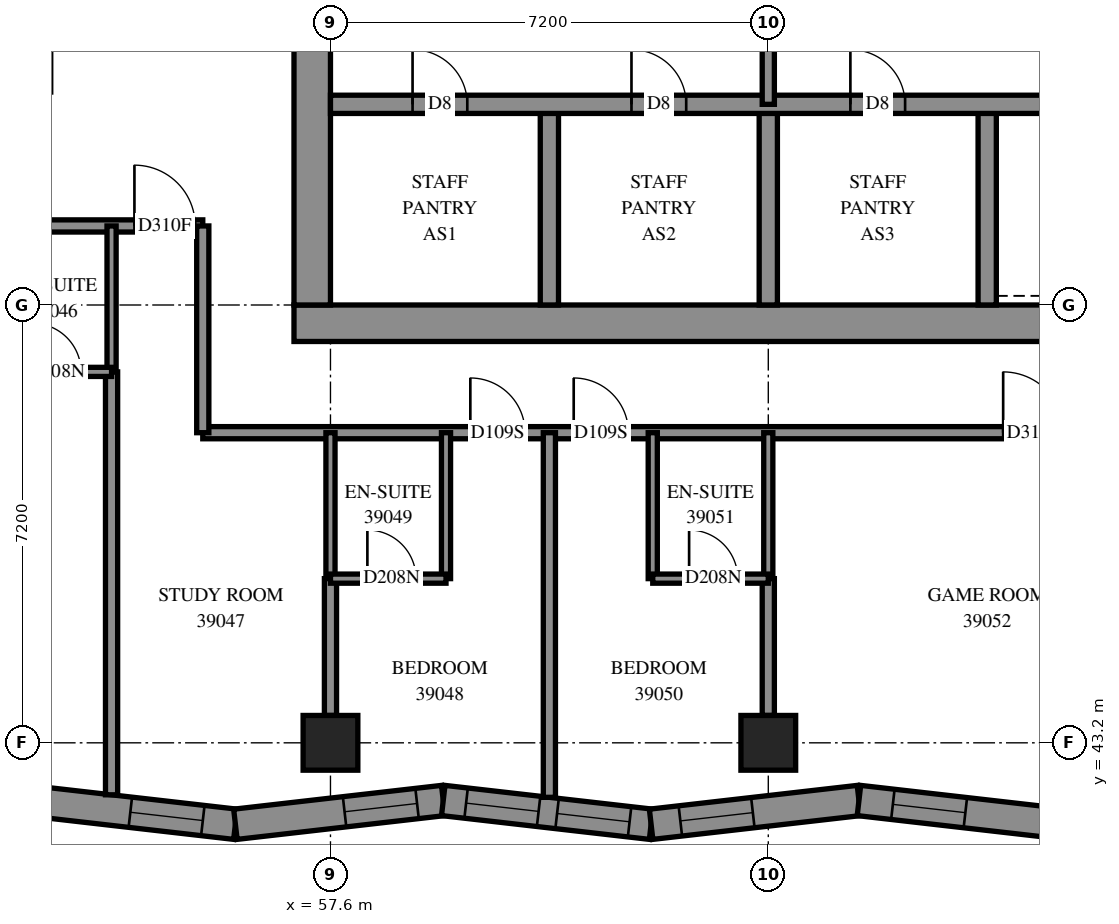
"""IFC4 building model, lengths in metres.
Left out: names, types, materials, properties, quantities, classifications, styles, units other than length and angle.
Written with IfcOpenShell. Run it as: python <this file> out.ifc"""

import sys

from ifc_helpers import new_model, si_unit, direction, frame, frame_2d, origin, origin_2d, place, context, subcontext, project, spatial, polyline, rectangle, outline, extrude, element, fill, save


model = new_model("IFC4")
c1 = context("Model", 3, precision=1e-05, world=origin(), true_north=direction((0.0, 1.0)))
c2 = subcontext(c1, "Body", "Model", "MODEL_VIEW")
j1 = project(units=[si_unit("LENGTHUNIT", "METRE"), si_unit("PLANEANGLEUNIT", "RADIAN")], contexts=[c1])
p1 = place(None, origin())
s1 = spatial("IfcSite", under=j1, at=p1, CompositionType="ELEMENT")
p2 = place(p1, origin())
s2 = spatial("IfcBuilding", under=s1, at=p2, CompositionType="ELEMENT")
p3 = place(p2, frame((0.0, 0.0, 145.6)))
s3 = spatial("IfcBuildingStorey", under=s2, at=p3, CompositionType="ELEMENT", Elevation=145.6)
for number, where, z_axis, x_axis in (
    (1, (57.6, 43.2, 0.0), (0.0, 0.0, 1.0), (1.0, 0.0, 0.0)),
    (2, (64.8, 43.2, 0.0), (0.0, 0.0, 1.0), (1.0, 0.0, 0.0)),
):
    element("IfcColumn", number, at=place(p3, frame(where, z_axis=z_axis, x_axis=x_axis)), inside=s3, PredefinedType="COLUMN", context=c2, shape_type="SweptSolid", body=[
        extrude(rectangle(XDim=0.9, YDim=0.9, at=origin_2d()), origin(), (0.0, 0.0, 1.0), 3.1),
    ])
p4 = place(p3, frame((57.0, 50.1, -0.3), z_axis=(0.0, 0.0, 1.0), x_axis=(1.0, 0.0, 0.0)))
e3 = element("IfcWall", 3, at=p4, inside=s3, PredefinedType="SHEAR", context=c2, shape_type="SweptSolid", body=[
    extrude(rectangle(XDim=15.6, YDim=0.6, at=frame_2d((7.8, 0.0))), origin(), (0.0, 0.0, 1.0), 2.7),
])
p5 = place(p3, frame((57.3, 50.4, -0.3), z_axis=(0.0, 0.0, 1.0), x_axis=(0.0, 1.0, 0.0)))
e4 = element("IfcWall", 4, at=p5, inside=s3, PredefinedType="SHEAR", context=c2, shape_type="SweptSolid", body=[
    extrude(rectangle(XDim=14.4, YDim=0.6, at=frame_2d((7.2, 0.0))), origin(), (0.0, 0.0, 1.0), 2.7),
])
p6 = place(p5, frame((4.55, 0.0, 0.3)))
e5 = element("IfcOpeningElement", 5, at=p6, cuts=e4, PredefinedType="OPENING", context=c2, shape_type="SweptSolid", body=[
    extrude(rectangle(XDim=1.1, YDim=2.1, at=frame_2d((0.55, 1.05))), frame((0.0, 0.31, 0.0), z_axis=(0.0, -1.0, 0.0), x_axis=(1.0, 0.0, 0.0)), (0.0, 0.0, 1.0), 0.62),
])
p7 = place(p5, frame((11.35, 0.0, 0.3)))
e6 = element("IfcOpeningElement", 6, at=p7, cuts=e4, PredefinedType="OPENING", context=c2, shape_type="SweptSolid", body=[
    extrude(rectangle(XDim=1.1, YDim=2.1, at=frame_2d((0.55, 1.05))), frame((0.0, 0.31, 0.0), z_axis=(0.0, -1.0, 0.0), x_axis=(1.0, 0.0, 0.0)), (0.0, 0.0, 1.0), 0.62),
])
for number, where, z_axis, x_axis in (
    (7, (61.2, 50.4, 0.0), (0.0, 0.0, 1.0), (0.0, 1.0, 0.0)),
    (8, (64.8, 50.4, 0.0), (0.0, 0.0, 1.0), (0.0, 1.0, 0.0)),
    (9, (68.4, 50.4, 0.0), (0.0, 0.0, 1.0), (0.0, 1.0, 0.0)),
):
    element("IfcWall", number, at=place(p3, frame(where, z_axis=z_axis, x_axis=x_axis)), inside=s3, PredefinedType="SOLIDWALL", context=c2, shape_type="SweptSolid", body=[
        extrude(rectangle(XDim=3.3, YDim=0.3, at=frame_2d((1.65, 0.0))), origin(), (0.0, 0.0, 1.0), 3.1),
    ])
p8 = place(p3, frame((57.6, 53.7, 0.0), z_axis=(0.0, 0.0, 1.0), x_axis=(1.0, 0.0, 0.0)))
e10 = element("IfcWall", 10, at=p8, inside=s3, PredefinedType="SOLIDWALL", context=c2, shape_type="SweptSolid", body=[
    extrude(rectangle(XDim=14.4, YDim=0.3, at=frame_2d((7.2, 0.0))), origin(), (0.0, 0.0, 1.0), 3.1),
])
p9 = place(p8, frame((1.35, 0.0, 0.0)))
e11 = element("IfcOpeningElement", 11, at=p9, cuts=e10, PredefinedType="OPENING", context=c2, shape_type="SweptSolid", body=[
    extrude(rectangle(XDim=0.9, YDim=2.1, at=frame_2d((0.45, 1.05))), frame((0.0, 0.16, 0.0), z_axis=(0.0, -1.0, 0.0), x_axis=(1.0, 0.0, 0.0)), (0.0, 0.0, 1.0), 0.32),
])
p10 = place(p8, frame((4.95, 0.0, 0.0)))
e12 = element("IfcOpeningElement", 12, at=p10, cuts=e10, PredefinedType="OPENING", context=c2, shape_type="SweptSolid", body=[
    extrude(rectangle(XDim=0.9, YDim=2.1, at=frame_2d((0.45, 1.05))), frame((0.0, 0.16, 0.0), z_axis=(0.0, -1.0, 0.0), x_axis=(1.0, 0.0, 0.0)), (0.0, 0.0, 1.0), 0.32),
])
p11 = place(p8, frame((8.55, 0.0, 0.0)))
e13 = element("IfcOpeningElement", 13, at=p11, cuts=e10, PredefinedType="OPENING", context=c2, shape_type="SweptSolid", body=[
    extrude(rectangle(XDim=0.9, YDim=2.1, at=frame_2d((0.45, 1.05))), frame((0.0, 0.16, 0.0), z_axis=(0.0, -1.0, 0.0), x_axis=(1.0, 0.0, 0.0)), (0.0, 0.0, 1.0), 0.32),
])
p12 = place(p8, frame((12.05, 0.0, 0.0)))
e14 = element("IfcOpeningElement", 14, at=p12, cuts=e10, PredefinedType="OPENING", context=c2, shape_type="SweptSolid", body=[
    extrude(rectangle(XDim=1.1, YDim=2.1, at=frame_2d((0.55, 1.05))), frame((0.0, 0.16, 0.0), z_axis=(0.0, -1.0, 0.0), x_axis=(1.0, 0.0, 0.0)), (0.0, 0.0, 1.0), 0.32),
])
p13 = place(p3, frame((52.597, 42.254, 0.0), z_axis=(0.0, 0.0, 1.0), x_axis=(0.9935199118, -0.1136581927, 0.0)))
e15 = element("IfcWall", 15, at=p13, inside=s3, PredefinedType="SOLIDWALL", context=c2, shape_type="SweptSolid", body=[
    extrude(outline(polyline([(0.05, -0.25), (3.491, -0.25), (3.433, 0.25), (-0.05, 0.25), (0.05, -0.25)])), origin(), (0.0, 0.0, 1.0), 3.1),
])
p14 = place(p13, frame((1.723, 0.0, 0.45)))
e16 = element("IfcOpeningElement", 16, at=p14, cuts=e15, PredefinedType="OPENING", context=c2, shape_type="SweptSolid", body=[
    extrude(rectangle(XDim=1.2, YDim=2.5, at=frame_2d((0.6, 1.25))), frame((0.0, 0.26, 0.0), z_axis=(0.0, -1.0, 0.0), x_axis=(1.0, 0.0, 0.0)), (0.0, 0.0, 1.0), 0.52),
])
p15 = place(p3, frame((56.036, 41.861, 0.0), z_axis=(0.0, 0.0, 1.0), x_axis=(0.9935208627, 0.1136498807, 0.0)))
e17 = element("IfcWall", 17, at=p15, inside=s3, PredefinedType="SOLIDWALL", context=c2, shape_type="SweptSolid", body=[
    extrude(outline(polyline([(-0.029, -0.25), (3.412, -0.25), (3.469, 0.25), (0.029, 0.25), (-0.029, -0.25)])), origin(), (0.0, 0.0, 1.0), 3.1),
])
p16 = place(p15, frame((1.807, 0.0, 0.45)))
e18 = element("IfcOpeningElement", 18, at=p16, cuts=e17, PredefinedType="OPENING", context=c2, shape_type="SweptSolid", body=[
    extrude(rectangle(XDim=1.2, YDim=2.5, at=frame_2d((0.6, 1.25))), frame((0.0, 0.26, 0.0), z_axis=(0.0, -1.0, 0.0), x_axis=(1.0, 0.0, 0.0)), (0.0, 0.0, 1.0), 0.52),
])
p17 = place(p3, frame((59.455, 42.252, 0.0), z_axis=(0.0, 0.0, 1.0), x_axis=(0.9935212381, -0.1136465988, 0.0)))
e19 = element("IfcWall", 19, at=p17, inside=s3, PredefinedType="SOLIDWALL", context=c2, shape_type="SweptSolid", body=[
    extrude(outline(polyline([(0.029, -0.25), (3.469, -0.25), (3.412, 0.25), (-0.029, 0.25), (0.029, -0.25)])), origin(), (0.0, 0.0, 1.0), 3.1),
])
p18 = place(p17, frame((0.378, 0.0, 0.45)))
e20 = element("IfcOpeningElement", 20, at=p18, cuts=e19, PredefinedType="OPENING", context=c2, shape_type="SweptSolid", body=[
    extrude(rectangle(XDim=1.2, YDim=2.5, at=frame_2d((0.6, 1.25))), frame((0.0, 0.26, 0.0), z_axis=(0.0, -1.0, 0.0), x_axis=(1.0, 0.0, 0.0)), (0.0, 0.0, 1.0), 0.52),
])
p19 = place(p17, frame((1.884, 0.0, 0.45)))
e21 = element("IfcOpeningElement", 21, at=p19, cuts=e19, PredefinedType="OPENING", context=c2, shape_type="SweptSolid", body=[
    extrude(rectangle(XDim=1.2, YDim=2.5, at=frame_2d((0.6, 1.25))), frame((0.0, 0.26, 0.0), z_axis=(0.0, -1.0, 0.0), x_axis=(1.0, 0.0, 0.0)), (0.0, 0.0, 1.0), 0.52),
])
p20 = place(p3, frame((62.873, 41.861, 0.0), z_axis=(0.0, 0.0, 1.0), x_axis=(0.9935212381, 0.1136465988, 0.0)))
e22 = element("IfcWall", 22, at=p20, inside=s3, PredefinedType="SOLIDWALL", context=c2, shape_type="SweptSolid", body=[
    extrude(outline(polyline([(-0.029, -0.25), (3.412, -0.25), (3.469, 0.25), (0.029, 0.25), (-0.029, -0.25)])), origin(), (0.0, 0.0, 1.0), 3.1),
])
p21 = place(p20, frame((0.484, 0.0, 0.45)))
e23 = element("IfcOpeningElement", 23, at=p21, cuts=e22, PredefinedType="OPENING", context=c2, shape_type="SweptSolid", body=[
    extrude(rectangle(XDim=1.2, YDim=2.5, at=frame_2d((0.6, 1.25))), frame((0.0, 0.26, 0.0), z_axis=(0.0, -1.0, 0.0), x_axis=(1.0, 0.0, 0.0)), (0.0, 0.0, 1.0), 0.52),
])
p22 = place(p3, frame((66.291, 42.252, 0.0), z_axis=(0.0, 0.0, 1.0), x_axis=(0.9935212381, -0.1136465988, 0.0)))
e24 = element("IfcWall", 24, at=p22, inside=s3, PredefinedType="SOLIDWALL", context=c2, shape_type="SweptSolid", body=[
    extrude(outline(polyline([(0.029, -0.25), (3.469, -0.25), (3.412, 0.25), (-0.029, 0.25), (0.029, -0.25)])), origin(), (0.0, 0.0, 1.0), 3.1),
])
p23 = place(p22, frame((0.561, 0.0, 0.45)))
e25 = element("IfcOpeningElement", 25, at=p23, cuts=e24, PredefinedType="OPENING", context=c2, shape_type="SweptSolid", body=[
    extrude(rectangle(XDim=1.2, YDim=2.5, at=frame_2d((0.6, 1.25))), frame((0.0, 0.26, 0.0), z_axis=(0.0, -1.0, 0.0), x_axis=(1.0, 0.0, 0.0)), (0.0, 0.0, 1.0), 0.52),
])
p24 = place(p3, frame((64.8, 53.7, 0.0), z_axis=(0.0, 0.0, 1.0), x_axis=(0.0, 1.0, 0.0)))
e26 = element("IfcWall", 26, at=p24, inside=s3, PredefinedType="PARTITIONING", context=c2, shape_type="SweptSolid", body=[
    extrude(rectangle(XDim=3.6, YDim=0.2, at=frame_2d((1.8, 0.0))), origin(), (0.0, 0.0, 1.0), 3.1),
])
p25 = place(p3, frame((55.5, 48.3, 0.0), z_axis=(0.0, 0.0, 1.0), x_axis=(1.0, 0.0, 0.0)))
e27 = element("IfcWall", 27, at=p25, inside=s3, PredefinedType="PARTITIONING", context=c2, shape_type="SweptSolid", body=[
    extrude(rectangle(XDim=18.974, YDim=0.2, at=frame_2d((9.487, 0.0))), origin(), (0.0, 0.0, 1.0), 3.1),
])
p26 = place(p25, frame((4.4, 0.0, 0.0)))
e28 = element("IfcOpeningElement", 28, at=p26, cuts=e27, PredefinedType="OPENING", context=c2, shape_type="SweptSolid", body=[
    extrude(rectangle(XDim=0.9, YDim=2.1, at=frame_2d((0.45, 1.05))), frame((0.0, 0.11, 0.0), z_axis=(0.0, -1.0, 0.0), x_axis=(1.0, 0.0, 0.0)), (0.0, 0.0, 1.0), 0.22),
])
p27 = place(p25, frame((6.1, 0.0, 0.0)))
e29 = element("IfcOpeningElement", 29, at=p27, cuts=e27, PredefinedType="OPENING", context=c2, shape_type="SweptSolid", body=[
    extrude(rectangle(XDim=0.9, YDim=2.1, at=frame_2d((0.45, 1.05))), frame((0.0, 0.11, 0.0), z_axis=(0.0, -1.0, 0.0), x_axis=(1.0, 0.0, 0.0)), (0.0, 0.0, 1.0), 0.22),
])
p28 = place(p25, frame((13.162, 0.0, 0.0)))
e30 = element("IfcOpeningElement", 30, at=p28, cuts=e27, PredefinedType="OPENING", context=c2, shape_type="SweptSolid", body=[
    extrude(rectangle(XDim=1.0, YDim=2.1, at=frame_2d((0.5, 1.05))), frame((0.0, 0.11, 0.0), z_axis=(0.0, -1.0, 0.0), x_axis=(1.0, 0.0, 0.0)), (0.0, 0.0, 1.0), 0.22),
])
p29 = place(p3, frame((54.0, 42.345, 0.0), z_axis=(0.0, 0.0, 1.0), x_axis=(0.0, 1.0, 0.0)))
e31 = element("IfcWall", 31, at=p29, inside=s3, PredefinedType="PARTITIONING", context=c2, shape_type="SweptSolid", body=[
    extrude(rectangle(XDim=6.955, YDim=0.2, at=frame_2d((3.477, 0.0))), origin(), (0.0, 0.0, 1.0), 3.1),
])
p30 = place(p3, frame((61.2, 42.304, 0.0), z_axis=(0.0, 0.0, 1.0), x_axis=(0.0, 1.0, 0.0)))
e32 = element("IfcWall", 32, at=p30, inside=s3, PredefinedType="PARTITIONING", context=c2, shape_type="SweptSolid", body=[
    extrude(rectangle(XDim=5.996, YDim=0.2, at=frame_2d((2.998, 0.0))), origin(), (0.0, 0.0, 1.0), 3.1),
])
p31 = place(p3, frame((50.4, 51.7, 0.0), z_axis=(0.0, 0.0, 1.0), x_axis=(1.0, 0.0, 0.0)))
e33 = element("IfcWall", 33, at=p31, inside=s3, PredefinedType="PARTITIONING", context=c2, shape_type="SweptSolid", body=[
    extrude(rectangle(XDim=5.1, YDim=0.2, at=frame_2d((2.55, 0.0))), origin(), (0.0, 0.0, 1.0), 3.1),
])
p32 = place(p31, frame((0.552, 0.0, 0.0)))
e34 = element("IfcOpeningElement", 34, at=p32, cuts=e33, PredefinedType="OPENING", context=c2, shape_type="SweptSolid", body=[
    extrude(rectangle(XDim=0.9, YDim=2.1, at=frame_2d((0.45, 1.05))), frame((0.0, 0.11, 0.0), z_axis=(0.0, -1.0, 0.0), x_axis=(1.0, 0.0, 0.0)), (0.0, 0.0, 1.0), 0.22),
])
p33 = place(p31, frame((3.976, 0.0, 0.0)))
e35 = element("IfcOpeningElement", 35, at=p33, cuts=e33, PredefinedType="OPENING", context=c2, shape_type="SweptSolid", body=[
    extrude(rectangle(XDim=1.0, YDim=2.1, at=frame_2d((0.5, 1.05))), frame((0.0, 0.11, 0.0), z_axis=(0.0, -1.0, 0.0), x_axis=(1.0, 0.0, 0.0)), (0.0, 0.0, 1.0), 0.22),
])
p34 = place(p3, frame((55.5, 48.3, 0.0), z_axis=(0.0, 0.0, 1.0), x_axis=(0.0, 1.0, 0.0)))
e36 = element("IfcWall", 36, at=p34, inside=s3, PredefinedType="PARTITIONING", context=c2, shape_type="SweptSolid", body=[
    extrude(rectangle(XDim=3.4, YDim=0.2, at=frame_2d((1.7, 0.0))), origin(), (0.0, 0.0, 1.0), 3.1),
])
for number, where, z_axis, x_axis in (
    (37, (54.0, 49.3, 0.0), (0.0, 0.0, 1.0), (0.0, 1.0, 0.0)),
    (38, (59.5, 45.9, 0.0), (0.0, 0.0, 1.0), (0.0, 1.0, 0.0)),
    (39, (57.6, 45.9, 0.0), (0.0, 0.0, 1.0), (0.0, 1.0, 0.0)),
    (40, (62.9, 45.9, 0.0), (0.0, 0.0, 1.0), (0.0, 1.0, 0.0)),
    (41, (64.8, 45.9, 0.0), (0.0, 0.0, 1.0), (0.0, 1.0, 0.0)),
):
    element("IfcWall", number, at=place(p3, frame(where, z_axis=z_axis, x_axis=x_axis)), inside=s3, PredefinedType="PARTITIONING", context=c2, shape_type="SweptSolid", body=[
        extrude(rectangle(XDim=2.4, YDim=0.15, at=frame_2d((1.2, 0.0))), origin(), (0.0, 0.0, 1.0), 3.1),
    ])
for number, where, z_axis, x_axis in (
    (42, (57.6, 43.65, 0.0), (0.0, 0.0, 1.0), (0.0, 1.0, 0.0)),
    (43, (64.8, 43.65, 0.0), (0.0, 0.0, 1.0), (0.0, 1.0, 0.0)),
):
    element("IfcWall", number, at=place(p3, frame(where, z_axis=z_axis, x_axis=x_axis)), inside=s3, PredefinedType="PARTITIONING", context=c2, shape_type="SweptSolid", body=[
        extrude(rectangle(XDim=2.25, YDim=0.2, at=frame_2d((1.125, 0.0))), origin(), (0.0, 0.0, 1.0), 3.1),
    ])
p35 = place(p3, frame((52.1, 49.3, 0.0), z_axis=(0.0, 0.0, 1.0), x_axis=(1.0, 0.0, 0.0)))
e44 = element("IfcWall", 44, at=p35, inside=s3, PredefinedType="PARTITIONING", context=c2, shape_type="SweptSolid", body=[
    extrude(rectangle(XDim=1.9, YDim=0.15, at=frame_2d((0.95, 0.0))), origin(), (0.0, 0.0, 1.0), 3.1),
])
p36 = place(p35, frame((0.598, 0.0, 0.0)))
e45 = element("IfcOpeningElement", 45, at=p36, cuts=e44, PredefinedType="OPENING", context=c2, shape_type="SweptSolid", body=[
    extrude(rectangle(XDim=0.8, YDim=2.1, at=frame_2d((0.4, 1.05))), frame((0.0, 0.085, 0.0), z_axis=(0.0, -1.0, 0.0), x_axis=(1.0, 0.0, 0.0)), (0.0, 0.0, 1.0), 0.17),
])
p37 = place(p3, frame((57.6, 45.9, 0.0), z_axis=(0.0, 0.0, 1.0), x_axis=(1.0, 0.0, 0.0)))
e46 = element("IfcWall", 46, at=p37, inside=s3, PredefinedType="PARTITIONING", context=c2, shape_type="SweptSolid", body=[
    extrude(rectangle(XDim=1.9, YDim=0.15, at=frame_2d((0.95, 0.0))), origin(), (0.0, 0.0, 1.0), 3.1),
])
p38 = place(p37, frame((0.607, 0.0, 0.0)))
e47 = element("IfcOpeningElement", 47, at=p38, cuts=e46, PredefinedType="OPENING", context=c2, shape_type="SweptSolid", body=[
    extrude(rectangle(XDim=0.8, YDim=2.1, at=frame_2d((0.4, 1.05))), frame((0.0, 0.085, 0.0), z_axis=(0.0, -1.0, 0.0), x_axis=(1.0, 0.0, 0.0)), (0.0, 0.0, 1.0), 0.17),
])
p39 = place(p3, frame((62.9, 45.9, 0.0), z_axis=(0.0, 0.0, 1.0), x_axis=(1.0, 0.0, 0.0)))
e48 = element("IfcWall", 48, at=p39, inside=s3, PredefinedType="PARTITIONING", context=c2, shape_type="SweptSolid", body=[
    extrude(rectangle(XDim=1.9, YDim=0.15, at=frame_2d((0.95, 0.0))), origin(), (0.0, 0.0, 1.0), 3.1),
])
p40 = place(p39, frame((0.598, 0.0, 0.0)))
e49 = element("IfcOpeningElement", 49, at=p40, cuts=e48, PredefinedType="OPENING", context=c2, shape_type="SweptSolid", body=[
    extrude(rectangle(XDim=0.8, YDim=2.1, at=frame_2d((0.4, 1.05))), frame((0.0, 0.085, 0.0), z_axis=(0.0, -1.0, 0.0), x_axis=(1.0, 0.0, 0.0)), (0.0, 0.0, 1.0), 0.17),
])
p41 = place(p14, origin())
e50 = element("IfcWindow", 50, at=p41, inside=s3, PartitioningType="SINGLE_PANEL", PredefinedType="WINDOW", context=c2, shape_type="SweptSolid", body=[
    extrude(rectangle(XDim=1.2, YDim=2.5, at=frame_2d((0.6, 1.25))), frame((0.0, 0.18, 0.0), z_axis=(0.0, -1.0, 0.0), x_axis=(1.0, 0.0, 0.0)), (0.0, 0.0, 1.0), 0.06),
])
fill(e16, e50)
p42 = place(p16, origin())
e51 = element("IfcWindow", 51, at=p42, inside=s3, PartitioningType="SINGLE_PANEL", PredefinedType="WINDOW", context=c2, shape_type="SweptSolid", body=[
    extrude(rectangle(XDim=1.2, YDim=2.5, at=frame_2d((0.6, 1.25))), frame((0.0, 0.18, 0.0), z_axis=(0.0, -1.0, 0.0), x_axis=(1.0, 0.0, 0.0)), (0.0, 0.0, 1.0), 0.06),
])
fill(e18, e51)
p43 = place(p18, origin())
e52 = element("IfcWindow", 52, at=p43, inside=s3, PartitioningType="SINGLE_PANEL", PredefinedType="WINDOW", context=c2, shape_type="SweptSolid", body=[
    extrude(rectangle(XDim=1.2, YDim=2.5, at=frame_2d((0.6, 1.25))), frame((0.0, 0.18, 0.0), z_axis=(0.0, -1.0, 0.0), x_axis=(1.0, 0.0, 0.0)), (0.0, 0.0, 1.0), 0.06),
])
fill(e20, e52)
p44 = place(p19, origin())
e53 = element("IfcWindow", 53, at=p44, inside=s3, PartitioningType="SINGLE_PANEL", PredefinedType="WINDOW", context=c2, shape_type="SweptSolid", body=[
    extrude(rectangle(XDim=1.2, YDim=2.5, at=frame_2d((0.6, 1.25))), frame((0.0, 0.18, 0.0), z_axis=(0.0, -1.0, 0.0), x_axis=(1.0, 0.0, 0.0)), (0.0, 0.0, 1.0), 0.06),
])
fill(e21, e53)
p45 = place(p21, origin())
e54 = element("IfcWindow", 54, at=p45, inside=s3, PartitioningType="SINGLE_PANEL", PredefinedType="WINDOW", context=c2, shape_type="SweptSolid", body=[
    extrude(rectangle(XDim=1.2, YDim=2.5, at=frame_2d((0.6, 1.25))), frame((0.0, 0.18, 0.0), z_axis=(0.0, -1.0, 0.0), x_axis=(1.0, 0.0, 0.0)), (0.0, 0.0, 1.0), 0.06),
])
fill(e23, e54)
p46 = place(p23, origin())
e55 = element("IfcWindow", 55, at=p46, inside=s3, PartitioningType="SINGLE_PANEL", PredefinedType="WINDOW", context=c2, shape_type="SweptSolid", body=[
    extrude(rectangle(XDim=1.2, YDim=2.5, at=frame_2d((0.6, 1.25))), frame((0.0, 0.18, 0.0), z_axis=(0.0, -1.0, 0.0), x_axis=(1.0, 0.0, 0.0)), (0.0, 0.0, 1.0), 0.06),
])
fill(e25, e55)
p47 = place(p9, origin())
e56 = element("IfcDoor", 56, at=p47, inside=s3, OperationType="SINGLE_SWING_LEFT", PredefinedType="DOOR", context=c2, shape_type="SweptSolid", body=[
    extrude(rectangle(XDim=0.9, YDim=2.1, at=frame_2d((0.45, 1.05))), frame((0.0, 0.025, 0.0), z_axis=(0.0, -1.0, 0.0), x_axis=(1.0, 0.0, 0.0)), (0.0, 0.0, 1.0), 0.05),
])
fill(e11, e56)
p48 = place(p10, origin())
e57 = element("IfcDoor", 57, at=p48, inside=s3, OperationType="SINGLE_SWING_LEFT", PredefinedType="DOOR", context=c2, shape_type="SweptSolid", body=[
    extrude(rectangle(XDim=0.9, YDim=2.1, at=frame_2d((0.45, 1.05))), frame((0.0, 0.025, 0.0), z_axis=(0.0, -1.0, 0.0), x_axis=(1.0, 0.0, 0.0)), (0.0, 0.0, 1.0), 0.05),
])
fill(e12, e57)
p49 = place(p11, origin())
e58 = element("IfcDoor", 58, at=p49, inside=s3, OperationType="SINGLE_SWING_LEFT", PredefinedType="DOOR", context=c2, shape_type="SweptSolid", body=[
    extrude(rectangle(XDim=0.9, YDim=2.1, at=frame_2d((0.45, 1.05))), frame((0.0, 0.025, 0.0), z_axis=(0.0, -1.0, 0.0), x_axis=(1.0, 0.0, 0.0)), (0.0, 0.0, 1.0), 0.05),
])
fill(e13, e58)
p50 = place(p36, origin())
e59 = element("IfcDoor", 59, at=p50, inside=s3, OperationType="SINGLE_SWING_RIGHT", PredefinedType="DOOR", context=c2, shape_type="SweptSolid", body=[
    extrude(rectangle(XDim=0.8, YDim=2.1, at=frame_2d((0.4, 1.05))), frame((0.0, 0.025, 0.0), z_axis=(0.0, -1.0, 0.0), x_axis=(1.0, 0.0, 0.0)), (0.0, 0.0, 1.0), 0.05),
])
fill(e45, e59)
p51 = place(p33, origin())
e60 = element("IfcDoor", 60, at=p51, inside=s3, OperationType="SINGLE_SWING_RIGHT", PredefinedType="DOOR", context=c2, shape_type="SweptSolid", body=[
    extrude(rectangle(XDim=1.0, YDim=2.1, at=frame_2d((0.5, 1.05))), frame((0.0, 0.025, 0.0), z_axis=(0.0, -1.0, 0.0), x_axis=(1.0, 0.0, 0.0)), (0.0, 0.0, 1.0), 0.05),
])
fill(e35, e60)
p52 = place(p26, origin())
e61 = element("IfcDoor", 61, at=p52, inside=s3, OperationType="SINGLE_SWING_LEFT", PredefinedType="DOOR", context=c2, shape_type="SweptSolid", body=[
    extrude(rectangle(XDim=0.9, YDim=2.1, at=frame_2d((0.45, 1.05))), frame((0.0, 0.025, 0.0), z_axis=(0.0, -1.0, 0.0), x_axis=(1.0, 0.0, 0.0)), (0.0, 0.0, 1.0), 0.05),
])
fill(e28, e61)
p53 = place(p38, origin())
e62 = element("IfcDoor", 62, at=p53, inside=s3, OperationType="SINGLE_SWING_RIGHT", PredefinedType="DOOR", context=c2, shape_type="SweptSolid", body=[
    extrude(rectangle(XDim=0.8, YDim=2.1, at=frame_2d((0.4, 1.05))), frame((0.0, 0.025, 0.0), z_axis=(0.0, -1.0, 0.0), x_axis=(1.0, 0.0, 0.0)), (0.0, 0.0, 1.0), 0.05),
])
fill(e47, e62)
p54 = place(p27, origin())
e63 = element("IfcDoor", 63, at=p54, inside=s3, OperationType="SINGLE_SWING_RIGHT", PredefinedType="DOOR", context=c2, shape_type="SweptSolid", body=[
    extrude(rectangle(XDim=0.9, YDim=2.1, at=frame_2d((0.45, 1.05))), frame((0.0, 0.025, 0.0), z_axis=(0.0, -1.0, 0.0), x_axis=(1.0, 0.0, 0.0)), (0.0, 0.0, 1.0), 0.05),
])
fill(e29, e63)
p55 = place(p40, origin())
e64 = element("IfcDoor", 64, at=p55, inside=s3, OperationType="SINGLE_SWING_RIGHT", PredefinedType="DOOR", context=c2, shape_type="SweptSolid", body=[
    extrude(rectangle(XDim=0.8, YDim=2.1, at=frame_2d((0.4, 1.05))), frame((0.0, 0.025, 0.0), z_axis=(0.0, -1.0, 0.0), x_axis=(1.0, 0.0, 0.0)), (0.0, 0.0, 1.0), 0.05),
])
fill(e49, e64)
p56 = place(p28, origin())
e65 = element("IfcDoor", 65, at=p56, inside=s3, OperationType="SINGLE_SWING_LEFT", PredefinedType="DOOR", context=c2, shape_type="SweptSolid", body=[
    extrude(rectangle(XDim=1.0, YDim=2.1, at=frame_2d((0.5, 1.05))), frame((0.0, 0.025, 0.0), z_axis=(0.0, -1.0, 0.0), x_axis=(1.0, 0.0, 0.0)), (0.0, 0.0, 1.0), 0.05),
])
fill(e30, e65)
save(model, sys.argv[1])
